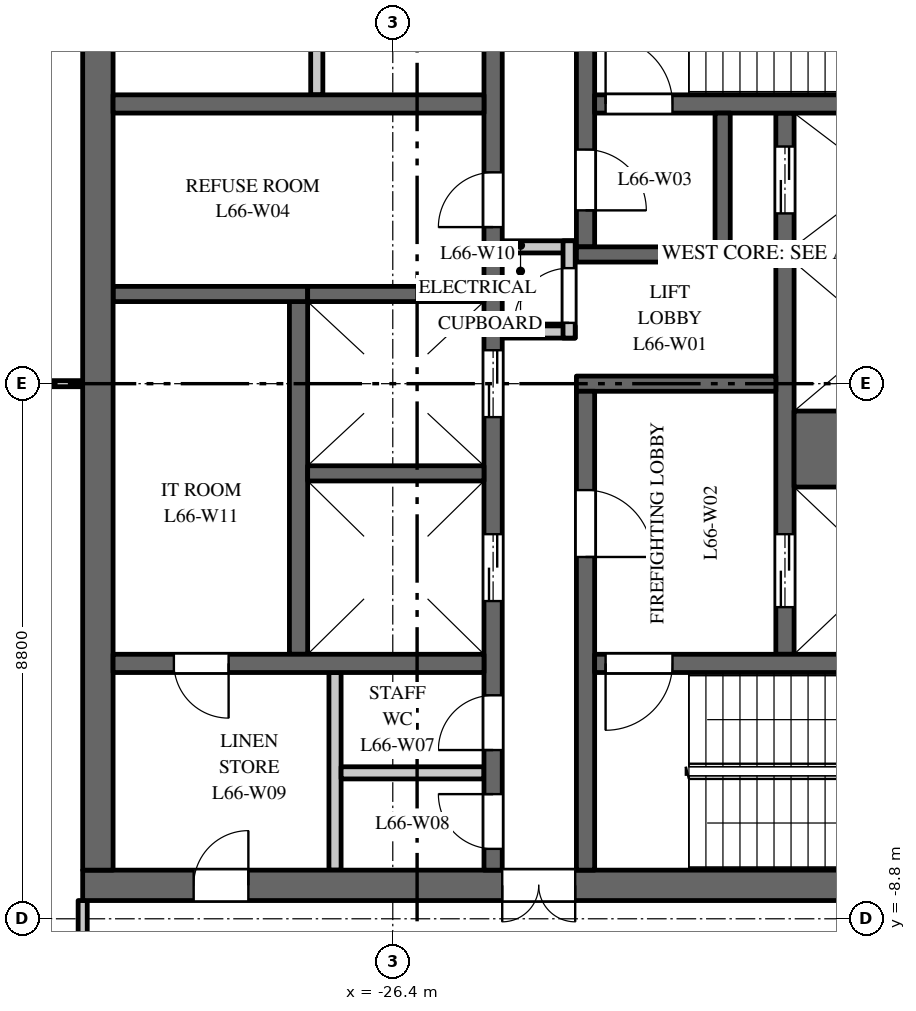
"""IFC4 building model, lengths in metres.
Left out: names, types, materials, properties, quantities, classifications, styles, units other than length and angle.
Written with IfcOpenShell. Run it as: python <this file> out.ifc"""

import sys

from ifc_helpers import new_model, si_unit, direction, frame, frame_2d, origin, place, context, subcontext, project, spatial, rectangle, extrude, element, fill, save


model = new_model("IFC4")
c1 = context("Model", 3, precision=1e-05, world=origin(), true_north=direction((0.0, 1.0)))
c2 = subcontext(c1, "Body", "Model", "MODEL_VIEW")
j1 = project(units=[si_unit("LENGTHUNIT", "METRE"), si_unit("PLANEANGLEUNIT", "RADIAN")], contexts=[c1])
p1 = place(None, origin())
s1 = spatial("IfcSite", under=j1, at=p1, CompositionType="ELEMENT")
p2 = place(p1, origin())
s2 = spatial("IfcBuilding", under=s1, at=p2, CompositionType="ELEMENT")
p3 = place(p2, frame((0.0, 0.0, 307.0)))
s3 = spatial("IfcBuildingStorey", under=s2, at=p3, CompositionType="ELEMENT", Elevation=307.0)
p4 = place(p3, frame((-16.5, -8.25, 0.0), z_axis=(0.0, 0.0, 1.0), x_axis=(-1.0, 0.0, 0.0)))
e1 = element("IfcWall", 1, at=p4, inside=s3, PredefinedType="SHEAR", context=c2, shape_type="SweptSolid", body=[
    extrude(rectangle(XDim=15.0, YDim=0.5, at=frame_2d((7.5, 0.0))), origin(), (0.0, 0.0, 1.0), 3.7),
])
p5 = place(p4, frame((6.9, 0.0, 0.0)))
e2 = element("IfcOpeningElement", 2, at=p5, cuts=e1, PredefinedType="OPENING", context=c2, shape_type="SweptSolid", body=[
    extrude(rectangle(XDim=1.2, YDim=2.1, at=frame_2d((0.6, 1.05))), frame((0.0, 0.26, 0.0), z_axis=(0.0, -1.0, 0.0), x_axis=(1.0, 0.0, 0.0)), (0.0, 0.0, 1.0), 0.52),
])
p6 = place(p4, frame((12.275, 0.0, 0.0)))
e3 = element("IfcOpeningElement", 3, at=p6, cuts=e1, PredefinedType="OPENING", context=c2, shape_type="SweptSolid", body=[
    extrude(rectangle(XDim=0.9, YDim=2.1, at=frame_2d((0.45, 1.05))), frame((0.0, 0.26, 0.0), z_axis=(0.0, -1.0, 0.0), x_axis=(1.0, 0.0, 0.0)), (0.0, 0.0, 1.0), 0.52),
])
p7 = place(p3, frame((-27.95, -4.45, 0.0), z_axis=(0.0, 0.0, 1.0), x_axis=(0.0, 1.0, 0.0)))
e4 = element("IfcWall", 4, at=p7, inside=s3, PredefinedType="SHEAR", context=c2, shape_type="SweptSolid", body=[
    extrude(rectangle(XDim=5.8, YDim=0.3, at=frame_2d((2.9, 0.0))), origin(), (0.0, 0.0, 1.0), 3.7),
])
p8 = place(p3, frame((-27.8, 1.475, 0.0), z_axis=(0.0, 0.0, 1.0), x_axis=(-1.0, 0.0, 0.0)))
e5 = element("IfcWall", 5, at=p8, inside=s3, PredefinedType="SHEAR", context=c2, shape_type="SweptSolid", body=[
    extrude(rectangle(XDim=3.2, YDim=0.25, at=frame_2d((1.6, 0.0))), origin(), (0.0, 0.0, 1.0), 3.7),
])
p9 = place(p3, frame((-19.95, -4.45, 0.0), z_axis=(0.0, 0.0, 1.0), x_axis=(0.0, 1.0, 0.0)))
e6 = element("IfcWall", 6, at=p9, inside=s3, PredefinedType="SHEAR", context=c2, shape_type="SweptSolid", body=[
    extrude(rectangle(XDim=8.9, YDim=0.3, at=frame_2d((4.45, 0.0))), origin(), (0.0, 0.0, 1.0), 3.7),
])
p10 = place(p9, frame((0.775, 0.0, 0.0)))
e7 = element("IfcOpeningElement", 7, at=p10, cuts=e6, PredefinedType="OPENING", context=c2, shape_type="SweptSolid", body=[
    extrude(rectangle(XDim=1.2, YDim=2.1, at=frame_2d((0.6, 1.05))), frame((0.0, 0.16, 0.0), z_axis=(0.0, -1.0, 0.0), x_axis=(1.0, 0.0, 0.0)), (0.0, 0.0, 1.0), 0.32),
])
p11 = place(p9, frame((7.25, 0.0, 0.0)))
e8 = element("IfcOpeningElement", 8, at=p11, cuts=e6, PredefinedType="OPENING", context=c2, shape_type="SweptSolid", body=[
    extrude(rectangle(XDim=1.1, YDim=2.1, at=frame_2d((0.55, 1.05))), frame((0.0, 0.16, 0.0), z_axis=(0.0, -1.0, 0.0), x_axis=(1.0, 0.0, 0.0)), (0.0, 0.0, 1.0), 0.32),
])
p12 = place(p3, frame((-24.75, -8.0, 0.0), z_axis=(0.0, 0.0, 1.0), x_axis=(0.0, 1.0, 0.0)))
e9 = element("IfcWall", 9, at=p12, inside=s3, PredefinedType="SHEAR", context=c2, shape_type="SweptSolid", body=[
    extrude(rectangle(XDim=16.0, YDim=0.3, at=frame_2d((8.0, 0.0))), origin(), (0.0, 0.0, 1.0), 3.7),
])
p13 = place(p12, frame((4.425, 0.0, 0.0)))
e10 = element("IfcOpeningElement", 10, at=p13, cuts=e9, PredefinedType="OPENING", context=c2, shape_type="SweptSolid", body=[
    extrude(rectangle(XDim=1.1, YDim=2.1, at=frame_2d((0.55, 1.05))), frame((0.0, 0.16, 0.0), z_axis=(0.0, -1.0, 0.0), x_axis=(1.0, 0.0, 0.0)), (0.0, 0.0, 1.0), 0.32),
])
p14 = place(p12, frame((7.45, 0.0, 0.0)))
e11 = element("IfcOpeningElement", 11, at=p14, cuts=e9, PredefinedType="OPENING", context=c2, shape_type="SweptSolid", body=[
    extrude(rectangle(XDim=1.1, YDim=2.1, at=frame_2d((0.55, 1.05))), frame((0.0, 0.16, 0.0), z_axis=(0.0, -1.0, 0.0), x_axis=(1.0, 0.0, 0.0)), (0.0, 0.0, 1.0), 0.32),
])
p15 = place(p12, frame((10.575, 0.0, 0.0)))
e12 = element("IfcOpeningElement", 12, at=p15, cuts=e9, PredefinedType="OPENING", context=c2, shape_type="SweptSolid", body=[
    extrude(rectangle(XDim=0.9, YDim=2.1, at=frame_2d((0.45, 1.05))), frame((0.0, 0.16, 0.0), z_axis=(0.0, -1.0, 0.0), x_axis=(1.0, 0.0, 0.0)), (0.0, 0.0, 1.0), 0.32),
])
p16 = place(p12, frame((13.75, 0.0, 0.0)))
e13 = element("IfcOpeningElement", 13, at=p16, cuts=e9, PredefinedType="OPENING", context=c2, shape_type="SweptSolid", body=[
    extrude(rectangle(XDim=0.9, YDim=2.1, at=frame_2d((0.45, 1.05))), frame((0.0, 0.16, 0.0), z_axis=(0.0, -1.0, 0.0), x_axis=(1.0, 0.0, 0.0)), (0.0, 0.0, 1.0), 0.32),
])
p17 = place(p12, frame((1.975, 0.0, 0.0)))
e14 = element("IfcOpeningElement", 14, at=p17, cuts=e9, PredefinedType="OPENING", context=c2, shape_type="SweptSolid", body=[
    extrude(rectangle(XDim=0.9, YDim=2.1, at=frame_2d((0.45, 1.05))), frame((0.0, 0.16, 0.0), z_axis=(0.0, -1.0, 0.0), x_axis=(1.0, 0.0, 0.0)), (0.0, 0.0, 1.0), 0.32),
])
p18 = place(p12, frame((0.35, 0.0, 0.0)))
e15 = element("IfcOpeningElement", 15, at=p18, cuts=e9, PredefinedType="OPENING", context=c2, shape_type="SweptSolid", body=[
    extrude(rectangle(XDim=0.9, YDim=2.1, at=frame_2d((0.45, 1.05))), frame((0.0, 0.16, 0.0), z_axis=(0.0, -1.0, 0.0), x_axis=(1.0, 0.0, 0.0)), (0.0, 0.0, 1.0), 0.32),
])
p19 = place(p3, frame((-20.1, 0.0, 0.0), z_axis=(0.0, 0.0, 1.0), x_axis=(-1.0, 0.0, 0.0)))
e16 = element("IfcWall", 16, at=p19, inside=s3, PredefinedType="SHEAR", context=c2, shape_type="SweptSolid", body=[
    extrude(rectangle(XDim=3.28, YDim=0.25, at=frame_2d((1.64, 0.0))), origin(), (0.0, 0.0, 1.0), 3.7),
])
for number, where, z_axis, x_axis in (
    (17, (-23.4, 0.85, 0.0), (0.0, 0.0, 1.0), (-1.0, 0.0, 0.0)),
    (18, (-23.4, 2.25, 0.0), (0.0, 0.0, 1.0), (-1.0, 0.0, 0.0)),
):
    element("IfcWall", number, at=place(p3, frame(where, z_axis=z_axis, x_axis=x_axis)), inside=s3, PredefinedType="PARTITIONING", context=c2, shape_type="SweptSolid", body=[
        extrude(rectangle(XDim=1.2, YDim=0.2, at=frame_2d((0.6, 0.0))), origin(), (0.0, 0.0, 1.0), 3.7),
    ])
p20 = place(p3, frame((-23.5, 0.75, 0.0), z_axis=(0.0, 0.0, 1.0), x_axis=(0.0, 1.0, 0.0)))
e19 = element("IfcWall", 19, at=p20, inside=s3, PredefinedType="PARTITIONING", context=c2, shape_type="SweptSolid", body=[
    extrude(rectangle(XDim=1.6, YDim=0.2, at=frame_2d((0.8, 0.0))), origin(), (0.0, 0.0, 1.0), 3.7),
])
p21 = place(p20, frame((0.25, 0.0, 0.0)))
e20 = element("IfcOpeningElement", 20, at=p21, cuts=e19, PredefinedType="OPENING", context=c2, shape_type="SweptSolid", body=[
    extrude(rectangle(XDim=0.9, YDim=2.1, at=frame_2d((0.45, 1.05))), frame((0.0, 0.11, 0.0), z_axis=(0.0, -1.0, 0.0), x_axis=(1.0, 0.0, 0.0)), (0.0, 0.0, 1.0), 0.22),
])
p22 = place(p3, frame((-31.25, -8.0, 0.0), z_axis=(0.0, 0.0, 1.0), x_axis=(0.0, 1.0, 0.0)))
e21 = element("IfcWall", 21, at=p22, inside=s3, PredefinedType="SHEAR", context=c2, shape_type="SweptSolid", body=[
    extrude(rectangle(XDim=16.0, YDim=0.5, at=frame_2d((8.0, 0.0))), origin(), (0.0, 0.0, 1.0), 3.7),
])
p23 = place(p3, frame((-24.9, 4.6, 0.0), z_axis=(0.0, 0.0, 1.0), x_axis=(-1.0, 0.0, 0.0)))
e22 = element("IfcWall", 22, at=p23, inside=s3, PredefinedType="SHEAR", context=c2, shape_type="SweptSolid", body=[
    extrude(rectangle(XDim=6.1, YDim=0.3, at=frame_2d((3.05, 0.0))), origin(), (0.0, 0.0, 1.0), 3.7),
])
for number, where, z_axis, x_axis in (
    (23, (-27.65, 4.75, 0.0), (0.0, 0.0, 1.0), (0.0, 1.0, 0.0)),
    (24, (-27.35, -8.0, 0.0), (0.0, 0.0, 1.0), (0.0, 1.0, 0.0)),
):
    element("IfcWall", number, at=place(p3, frame(where, z_axis=z_axis, x_axis=x_axis)), inside=s3, PredefinedType="PARTITIONING", context=c2, shape_type="SweptSolid", body=[
        extrude(rectangle(XDim=3.25, YDim=0.2, at=frame_2d((1.625, 0.0))), origin(), (0.0, 0.0, 1.0), 3.7),
    ])
p24 = place(p3, frame((-24.9, -6.4, 0.0), z_axis=(0.0, 0.0, 1.0), x_axis=(-1.0, 0.0, 0.0)))
e25 = element("IfcWall", 25, at=p24, inside=s3, PredefinedType="PARTITIONING", context=c2, shape_type="SweptSolid", body=[
    extrude(rectangle(XDim=2.35, YDim=0.2, at=frame_2d((1.175, 0.0))), origin(), (0.0, 0.0, 1.0), 3.7),
])
p25 = place(p3, frame((-24.9, -4.6, 0.0), z_axis=(0.0, 0.0, 1.0), x_axis=(-1.0, 0.0, 0.0)))
e26 = element("IfcWall", 26, at=p25, inside=s3, PredefinedType="SHEAR", context=c2, shape_type="SweptSolid", body=[
    extrude(rectangle(XDim=6.1, YDim=0.3, at=frame_2d((3.05, 0.0))), origin(), (0.0, 0.0, 1.0), 3.7),
])
p26 = place(p25, frame((4.2, 0.0, 0.0)))
e27 = element("IfcOpeningElement", 27, at=p26, cuts=e26, PredefinedType="OPENING", context=c2, shape_type="SweptSolid", body=[
    extrude(rectangle(XDim=0.9, YDim=2.1, at=frame_2d((0.45, 1.05))), frame((0.0, 0.16, 0.0), z_axis=(0.0, -1.0, 0.0), x_axis=(1.0, 0.0, 0.0)), (0.0, 0.0, 1.0), 0.32),
])
p27 = place(p3, frame((-16.9, -1.075, 0.0), z_axis=(0.0, 0.0, 1.0), x_axis=(-1.0, 0.0, 0.0)))
e28 = element("IfcWall", 28, at=p27, inside=s3, PredefinedType="SHEAR", context=c2, shape_type="SweptSolid", body=[
    extrude(rectangle(XDim=2.9, YDim=1.25, at=frame_2d((1.45, 0.0))), origin(), (0.0, 0.0, 1.0), 3.7),
])
for number, where, z_axis, x_axis in (
    (29, (-16.9, 2.125, 0.0), (0.0, 0.0, 1.0), (-1.0, 0.0, 0.0)),
    (30, (-24.9, -1.475, 0.0), (0.0, 0.0, 1.0), (-1.0, 0.0, 0.0)),
    (31, (-24.9, 1.475, 0.0), (0.0, 0.0, 1.0), (-1.0, 0.0, 0.0)),
):
    element("IfcWall", number, at=place(p3, frame(where, z_axis=z_axis, x_axis=x_axis)), inside=s3, PredefinedType="SHEAR", context=c2, shape_type="SweptSolid", body=[
        extrude(rectangle(XDim=2.9, YDim=0.25, at=frame_2d((1.45, 0.0))), origin(), (0.0, 0.0, 1.0), 3.7),
    ])
p28 = place(p3, frame((-23.23, 2.25, 0.0), z_axis=(0.0, 0.0, 1.0), x_axis=(0.0, 1.0, 0.0)))
e32 = element("IfcWall", 32, at=p28, inside=s3, PredefinedType="SHEAR", context=c2, shape_type="SweptSolid", body=[
    extrude(rectangle(XDim=5.75, YDim=0.3, at=frame_2d((2.875, 0.0))), origin(), (0.0, 0.0, 1.0), 3.7),
])
p29 = place(p28, frame((0.6, 0.0, 0.0)))
e33 = element("IfcOpeningElement", 33, at=p29, cuts=e32, PredefinedType="OPENING", context=c2, shape_type="SweptSolid", body=[
    extrude(rectangle(XDim=1.0, YDim=2.1, at=frame_2d((0.5, 1.05))), frame((0.0, 0.16, 0.0), z_axis=(0.0, -1.0, 0.0), x_axis=(1.0, 0.0, 0.0)), (0.0, 0.0, 1.0), 0.32),
])
p30 = place(p3, frame((-23.23, -8.0, 0.0), z_axis=(0.0, 0.0, 1.0), x_axis=(0.0, 1.0, 0.0)))
e34 = element("IfcWall", 34, at=p30, inside=s3, PredefinedType="SHEAR", context=c2, shape_type="SweptSolid", body=[
    extrude(rectangle(XDim=7.875, YDim=0.3, at=frame_2d((3.938, 0.0))), origin(), (0.0, 0.0, 1.0), 3.7),
])
p31 = place(p30, frame((5.15, 0.0, 0.0)))
e35 = element("IfcOpeningElement", 35, at=p31, cuts=e34, PredefinedType="OPENING", context=c2, shape_type="SweptSolid", body=[
    extrude(rectangle(XDim=1.1, YDim=2.1, at=frame_2d((0.55, 1.05))), frame((0.0, 0.16, 0.0), z_axis=(0.0, -1.0, 0.0), x_axis=(1.0, 0.0, 0.0)), (0.0, 0.0, 1.0), 0.32),
])
p32 = place(p3, frame((-16.9, 4.6, 0.0), z_axis=(0.0, 0.0, 1.0), x_axis=(-1.0, 0.0, 0.0)))
e36 = element("IfcWall", 36, at=p32, inside=s3, PredefinedType="SHEAR", context=c2, shape_type="SweptSolid", body=[
    extrude(rectangle(XDim=6.18, YDim=0.3, at=frame_2d((3.09, 0.0))), origin(), (0.0, 0.0, 1.0), 3.7),
])
p33 = place(p32, frame((4.9, 0.0, 0.0)))
e37 = element("IfcOpeningElement", 37, at=p33, cuts=e36, PredefinedType="OPENING", context=c2, shape_type="SweptSolid", body=[
    extrude(rectangle(XDim=1.1, YDim=2.1, at=frame_2d((0.55, 1.05))), frame((0.0, 0.16, 0.0), z_axis=(0.0, -1.0, 0.0), x_axis=(1.0, 0.0, 0.0)), (0.0, 0.0, 1.0), 0.32),
])
p34 = place(p3, frame((-16.9, -4.6, 0.0), z_axis=(0.0, 0.0, 1.0), x_axis=(-1.0, 0.0, 0.0)))
e38 = element("IfcWall", 38, at=p34, inside=s3, PredefinedType="SHEAR", context=c2, shape_type="SweptSolid", body=[
    extrude(rectangle(XDim=6.18, YDim=0.3, at=frame_2d((3.09, 0.0))), origin(), (0.0, 0.0, 1.0), 3.7),
])
p35 = place(p34, frame((4.9, 0.0, 0.0)))
e39 = element("IfcOpeningElement", 39, at=p35, cuts=e38, PredefinedType="OPENING", context=c2, shape_type="SweptSolid", body=[
    extrude(rectangle(XDim=1.1, YDim=2.1, at=frame_2d((0.55, 1.05))), frame((0.0, 0.16, 0.0), z_axis=(0.0, -1.0, 0.0), x_axis=(1.0, 0.0, 0.0)), (0.0, 0.0, 1.0), 0.32),
])
p36 = place(p3, frame((-20.85, 2.125, 0.0), z_axis=(0.0, 0.0, 1.0), x_axis=(-1.0, 0.0, 0.0)))
e40 = element("IfcWall", 40, at=p36, inside=s3, PredefinedType="SHEAR", context=c2, shape_type="SweptSolid", body=[
    extrude(rectangle(XDim=2.53, YDim=0.25, at=frame_2d((1.265, 0.0))), origin(), (0.0, 0.0, 1.0), 3.7),
])
p37 = place(p3, frame((-20.975, 2.25, 0.0), z_axis=(0.0, 0.0, 1.0), x_axis=(0.0, 1.0, 0.0)))
e41 = element("IfcWall", 41, at=p37, inside=s3, PredefinedType="SHEAR", context=c2, shape_type="SweptSolid", body=[
    extrude(rectangle(XDim=2.2, YDim=0.25, at=frame_2d((1.1, 0.0))), origin(), (0.0, 0.0, 1.0), 3.7),
])
p38 = place(p3, frame((-35.949, 0.0, 0.0), z_axis=(0.0, 0.0, 1.0), x_axis=(1.0, 0.0, 0.0)))
e42 = element("IfcWall", 42, at=p38, inside=s3, PredefinedType="PARTITIONING", context=c2, shape_type="SweptSolid", body=[
    extrude(rectangle(XDim=4.449, YDim=0.1, at=frame_2d((2.225, 0.0))), origin(), (0.0, 0.0, 1.0), 3.0),
])
p39 = place(p3, frame((-31.5, -11.5, 0.0), z_axis=(0.0, 0.0, 1.0), x_axis=(0.0, 1.0, 0.0)))
e43 = element("IfcWall", 43, at=p39, inside=s3, PredefinedType="PARTITIONING", context=c2, shape_type="SweptSolid", body=[
    extrude(rectangle(XDim=3.0, YDim=0.15, at=frame_2d((1.5, 0.0))), origin(), (0.0, 0.0, 1.0), 3.0),
])
p40 = place(p10, origin())
e44 = element("IfcDoor", 44, at=p40, inside=s3, OperationType="DOUBLE_DOOR_SLIDING", PredefinedType="DOOR", context=c2, shape_type="SweptSolid", body=[
    extrude(rectangle(XDim=1.2, YDim=2.1, at=frame_2d((0.6, 1.05))), frame((0.0, 0.025, 0.0), z_axis=(0.0, -1.0, 0.0), x_axis=(1.0, 0.0, 0.0)), (0.0, 0.0, 1.0), 0.05),
])
fill(e7, e44)
p41 = place(p11, origin())
e45 = element("IfcDoor", 45, at=p41, inside=s3, OperationType="DOUBLE_DOOR_SLIDING", PredefinedType="DOOR", context=c2, shape_type="SweptSolid", body=[
    extrude(rectangle(XDim=1.1, YDim=2.1, at=frame_2d((0.55, 1.05))), frame((0.0, 0.025, 0.0), z_axis=(0.0, -1.0, 0.0), x_axis=(1.0, 0.0, 0.0)), (0.0, 0.0, 1.0), 0.05),
])
fill(e8, e45)
p42 = place(p13, origin())
e46 = element("IfcDoor", 46, at=p42, inside=s3, OperationType="DOUBLE_DOOR_SLIDING", PredefinedType="DOOR", context=c2, shape_type="SweptSolid", body=[
    extrude(rectangle(XDim=1.1, YDim=2.1, at=frame_2d((0.55, 1.05))), frame((0.0, 0.025, 0.0), z_axis=(0.0, -1.0, 0.0), x_axis=(1.0, 0.0, 0.0)), (0.0, 0.0, 1.0), 0.05),
])
fill(e10, e46)
p43 = place(p14, origin())
e47 = element("IfcDoor", 47, at=p43, inside=s3, OperationType="DOUBLE_DOOR_SLIDING", PredefinedType="DOOR", context=c2, shape_type="SweptSolid", body=[
    extrude(rectangle(XDim=1.1, YDim=2.1, at=frame_2d((0.55, 1.05))), frame((0.0, 0.025, 0.0), z_axis=(0.0, -1.0, 0.0), x_axis=(1.0, 0.0, 0.0)), (0.0, 0.0, 1.0), 0.05),
])
fill(e11, e47)
p44 = place(p33, origin())
e48 = element("IfcDoor", 48, at=p44, inside=s3, OperationType="SINGLE_SWING_RIGHT", PredefinedType="DOOR", context=c2, shape_type="SweptSolid", body=[
    extrude(rectangle(XDim=1.1, YDim=2.1, at=frame_2d((0.55, 1.05))), frame((0.0, 0.025, 0.0), z_axis=(0.0, -1.0, 0.0), x_axis=(1.0, 0.0, 0.0)), (0.0, 0.0, 1.0), 0.05),
])
fill(e37, e48)
p45 = place(p35, origin())
e49 = element("IfcDoor", 49, at=p45, inside=s3, OperationType="SINGLE_SWING_LEFT", PredefinedType="DOOR", context=c2, shape_type="SweptSolid", body=[
    extrude(rectangle(XDim=1.1, YDim=2.1, at=frame_2d((0.55, 1.05))), frame((0.0, 0.025, 0.0), z_axis=(0.0, -1.0, 0.0), x_axis=(1.0, 0.0, 0.0)), (0.0, 0.0, 1.0), 0.05),
])
fill(e39, e49)
p46 = place(p31, origin())
e50 = element("IfcDoor", 50, at=p46, inside=s3, OperationType="SINGLE_SWING_LEFT", PredefinedType="DOOR", context=c2, shape_type="SweptSolid", body=[
    extrude(rectangle(XDim=1.1, YDim=2.1, at=frame_2d((0.55, 1.05))), frame((0.0, 0.025, 0.0), z_axis=(0.0, -1.0, 0.0), x_axis=(1.0, 0.0, 0.0)), (0.0, 0.0, 1.0), 0.05),
])
fill(e35, e50)
p47 = place(p29, origin())
e51 = element("IfcDoor", 51, at=p47, inside=s3, OperationType="SINGLE_SWING_LEFT", PredefinedType="DOOR", context=c2, shape_type="SweptSolid", body=[
    extrude(rectangle(XDim=1.0, YDim=2.1, at=frame_2d((0.5, 1.05))), frame((0.0, 0.025, 0.0), z_axis=(0.0, -1.0, 0.0), x_axis=(1.0, 0.0, 0.0)), (0.0, 0.0, 1.0), 0.05),
])
fill(e33, e51)
p48 = place(p5, origin())
e52 = element("IfcDoor", 52, at=p48, inside=s3, OperationType="DOUBLE_DOOR_DOUBLE_SWING", PredefinedType="DOOR", context=c2, shape_type="SweptSolid", body=[
    extrude(rectangle(XDim=1.2, YDim=2.1, at=frame_2d((0.6, 1.05))), frame((0.0, 0.025, 0.0), z_axis=(0.0, -1.0, 0.0), x_axis=(1.0, 0.0, 0.0)), (0.0, 0.0, 1.0), 0.05),
])
fill(e2, e52)
p49 = place(p15, origin())
e53 = element("IfcDoor", 53, at=p49, inside=s3, OperationType="SINGLE_SWING_RIGHT", PredefinedType="DOOR", context=c2, shape_type="SweptSolid", body=[
    extrude(rectangle(XDim=0.9, YDim=2.1, at=frame_2d((0.45, 1.05))), frame((0.0, 0.025, 0.0), z_axis=(0.0, -1.0, 0.0), x_axis=(1.0, 0.0, 0.0)), (0.0, 0.0, 1.0), 0.05),
])
fill(e12, e53)
p50 = place(p17, origin())
e54 = element("IfcDoor", 54, at=p50, inside=s3, OperationType="SINGLE_SWING_RIGHT", PredefinedType="DOOR", context=c2, shape_type="SweptSolid", body=[
    extrude(rectangle(XDim=0.9, YDim=2.1, at=frame_2d((0.45, 1.05))), frame((0.0, 0.025, 0.0), z_axis=(0.0, -1.0, 0.0), x_axis=(1.0, 0.0, 0.0)), (0.0, 0.0, 1.0), 0.05),
])
fill(e14, e54)
p51 = place(p18, origin())
e55 = element("IfcDoor", 55, at=p51, inside=s3, OperationType="SINGLE_SWING_LEFT", PredefinedType="DOOR", context=c2, shape_type="SweptSolid", body=[
    extrude(rectangle(XDim=0.9, YDim=2.1, at=frame_2d((0.45, 1.05))), frame((0.0, 0.025, 0.0), z_axis=(0.0, -1.0, 0.0), x_axis=(1.0, 0.0, 0.0)), (0.0, 0.0, 1.0), 0.05),
])
fill(e15, e55)
p52 = place(p6, origin())
e56 = element("IfcDoor", 56, at=p52, inside=s3, OperationType="SINGLE_SWING_LEFT", PredefinedType="DOOR", context=c2, shape_type="SweptSolid", body=[
    extrude(rectangle(XDim=0.9, YDim=2.1, at=frame_2d((0.45, 1.05))), frame((0.0, 0.025, 0.0), z_axis=(0.0, -1.0, 0.0), x_axis=(1.0, 0.0, 0.0)), (0.0, 0.0, 1.0), 0.05),
])
fill(e3, e56)
p53 = place(p21, origin())
e57 = element("IfcDoor", 57, at=p53, inside=s3, OperationType="SINGLE_SWING_RIGHT", PredefinedType="DOOR", context=c2, shape_type="SweptSolid", body=[
    extrude(rectangle(XDim=0.9, YDim=2.1, at=frame_2d((0.45, 1.05))), frame((0.0, 0.025, 0.0), z_axis=(0.0, -1.0, 0.0), x_axis=(1.0, 0.0, 0.0)), (0.0, 0.0, 1.0), 0.05),
])
fill(e20, e57)
p54 = place(p26, origin())
e58 = element("IfcDoor", 58, at=p54, inside=s3, OperationType="SINGLE_SWING_RIGHT", PredefinedType="DOOR", context=c2, shape_type="SweptSolid", body=[
    extrude(rectangle(XDim=0.9, YDim=2.1, at=frame_2d((0.45, 1.05))), frame((0.0, 0.025, 0.0), z_axis=(0.0, -1.0, 0.0), x_axis=(1.0, 0.0, 0.0)), (0.0, 0.0, 1.0), 0.05),
])
fill(e27, e58)
save(model, sys.argv[1])
